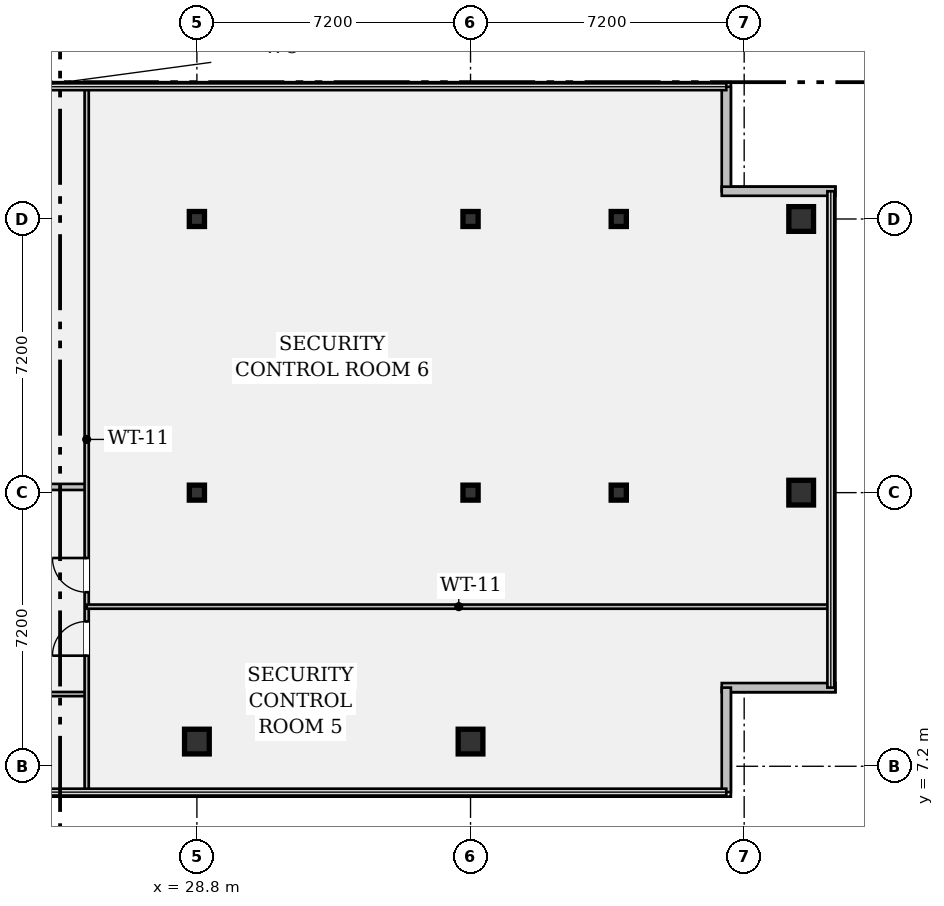
"""IFC4 building model, lengths in metres.
Left out: names, types, materials, properties, quantities, classifications, styles, units other than length and angle.
Written with IfcOpenShell. Run it as: python <this file> out.ifc"""

import sys

from ifc_helpers import new_model, si_unit, direction, frame, frame_2d, origin, origin_2d, place, context, subcontext, project, spatial, rectangle, hollow_rectangle, i_section, extrude, element, fill, save


model = new_model("IFC4")
c1 = context("Model", 3, precision=1e-05, world=origin(), true_north=direction((0.0, 1.0)))
c2 = subcontext(c1, "Body", "Model", "MODEL_VIEW")
j1 = project(units=[si_unit("LENGTHUNIT", "METRE"), si_unit("PLANEANGLEUNIT", "RADIAN")], contexts=[c1])
p1 = place(None, origin())
s1 = spatial("IfcSite", under=j1, at=p1, CompositionType="ELEMENT")
p2 = place(p1, origin())
s2 = spatial("IfcBuilding", under=s1, at=p2, CompositionType="ELEMENT")
p3 = place(p2, frame((0.0, 0.0, 241.15)))
s3 = spatial("IfcBuildingStorey", under=s2, at=p3, CompositionType="ELEMENT", Elevation=241.15)
p4 = place(p3, frame((28.8, 7.85, 0.0), z_axis=(0.0, 0.0, 1.0), x_axis=(1.0, 0.0, 0.0)))
e1 = element("IfcColumn", 1, at=p4, inside=s3, PredefinedType="COLUMN", context=c2, shape_type="SweptSolid", body=[
    extrude(hollow_rectangle(XDim=0.65, YDim=0.65, WallThickness=0.04, at=origin_2d()), origin(), (0.0, 0.0, 1.0), 3.24),
])
for number, where, z_axis, x_axis in (
    (2, (28.8, 14.4, 0.0), (0.0, 0.0, 1.0), (1.0, 0.0, 0.0)),
    (3, (28.8, 21.6, 0.0), (0.0, 0.0, 1.0), (1.0, 0.0, 0.0)),
):
    element("IfcColumn", number, at=place(p3, frame(where, z_axis=z_axis, x_axis=x_axis)), inside=s3, PredefinedType="COLUMN", context=c2, shape_type="SweptSolid", body=[
        extrude(i_section(OverallWidth=0.399, OverallDepth=0.394, WebThickness=0.023, FlangeThickness=0.037, FilletRadius=0.018, at=origin_2d()), origin(), (0.0, 0.0, 1.0), 3.24),
    ])
p5 = place(p3, frame((36.0, 7.85, 0.0), z_axis=(0.0, 0.0, 1.0), x_axis=(1.0, 0.0, 0.0)))
e4 = element("IfcColumn", 4, at=p5, inside=s3, PredefinedType="COLUMN", context=c2, shape_type="SweptSolid", body=[
    extrude(hollow_rectangle(XDim=0.65, YDim=0.65, WallThickness=0.04, at=origin_2d()), origin(), (0.0, 0.0, 1.0), 3.24),
])
for number, where, z_axis, x_axis in (
    (5, (36.0, 14.4, 0.0), (0.0, 0.0, 1.0), (1.0, 0.0, 0.0)),
    (6, (36.0, 21.6, 0.0), (0.0, 0.0, 1.0), (1.0, 0.0, 0.0)),
    (7, (39.9, 14.4, 0.0), (0.0, 0.0, 1.0), (1.0, 0.0, 0.0)),
    (8, (39.9, 21.6, 0.0), (0.0, 0.0, 1.0), (1.0, 0.0, 0.0)),
):
    element("IfcColumn", number, at=place(p3, frame(where, z_axis=z_axis, x_axis=x_axis)), inside=s3, PredefinedType="COLUMN", context=c2, shape_type="SweptSolid", body=[
        extrude(i_section(OverallWidth=0.399, OverallDepth=0.394, WebThickness=0.023, FlangeThickness=0.037, FilletRadius=0.018, at=origin_2d()), origin(), (0.0, 0.0, 1.0), 3.24),
    ])
for number, where, z_axis, x_axis in (
    (9, (44.7, 14.4, 0.0), (0.0, 0.0, 1.0), (1.0, 0.0, 0.0)),
    (10, (44.7, 21.6, 0.0), (0.0, 0.0, 1.0), (1.0, 0.0, 0.0)),
):
    element("IfcColumn", number, at=place(p3, frame(where, z_axis=z_axis, x_axis=x_axis)), inside=s3, PredefinedType="COLUMN", context=c2, shape_type="SweptSolid", body=[
        extrude(hollow_rectangle(XDim=0.65, YDim=0.65, WallThickness=0.04, at=origin_2d()), origin(), (0.0, 0.0, 1.0), 3.24),
    ])
p6 = place(p3, frame((42.73, 25.08, 0.0), z_axis=(0.0, 0.0, 1.0), x_axis=(0.0, -1.0, 0.0)))
e11 = element("IfcWall", 11, at=p6, inside=s3, PredefinedType="STANDARD", context=c2, shape_type="SweptSolid", body=[
    extrude(rectangle(XDim=2.75, YDim=0.24, at=frame_2d((1.375, 0.0))), origin(), (0.0, 0.0, 1.0), 3.24),
])
for number, where, z_axis, x_axis in (
    (12, (42.61, 22.33, 0.0), (0.0, 0.0, 1.0), (1.0, 0.0, 0.0)),
    (13, (45.6, 9.27, 0.0), (0.0, 0.0, 1.0), (-1.0, 0.0, 0.0)),
):
    element("IfcWall", number, at=place(p3, frame(where, z_axis=z_axis, x_axis=x_axis)), inside=s3, PredefinedType="STANDARD", context=c2, shape_type="SweptSolid", body=[
        extrude(rectangle(XDim=2.99, YDim=0.24, at=frame_2d((1.495, 0.0))), origin(), (0.0, 0.0, 1.0), 3.24),
    ])
p7 = place(p3, frame((42.73, 9.27, 0.0), z_axis=(0.0, 0.0, 1.0), x_axis=(0.0, -1.0, 0.0)))
e14 = element("IfcWall", 14, at=p7, inside=s3, PredefinedType="STANDARD", context=c2, shape_type="SweptSolid", body=[
    extrude(rectangle(XDim=2.75, YDim=0.24, at=frame_2d((1.375, 0.0))), origin(), (0.0, 0.0, 1.0), 3.24),
])
p8 = place(p3, frame((23.95, 9.1, 0.0), z_axis=(0.0, 0.0, 1.0), x_axis=(1.0, 0.0, 0.0)))
e15 = element("IfcWall", 15, at=p8, inside=s3, PredefinedType="PARTITIONING", context=c2, shape_type="SweptSolid", body=[
    extrude(rectangle(XDim=1.95, YDim=0.11, at=frame_2d((0.975, 0.0))), origin(), (0.0, 0.0, 1.0), 3.24),
])
p9 = place(p3, frame((23.95, 14.55, 0.0), z_axis=(0.0, 0.0, 1.0), x_axis=(1.0, 0.0, 0.0)))
e16 = element("IfcWall", 16, at=p9, inside=s3, PredefinedType="PARTITIONING", context=c2, shape_type="SweptSolid", body=[
    extrude(rectangle(XDim=1.95, YDim=0.16, at=frame_2d((0.975, 0.0))), origin(), (0.0, 0.0, 1.0), 2.676),
])
p10 = place(p3, frame((25.9, 6.52, 0.0), z_axis=(0.0, 0.0, 1.0), x_axis=(0.0, 1.0, 0.0)))
e17 = element("IfcWall", 17, at=p10, inside=s3, PredefinedType="PARTITIONING", context=c2, shape_type="SweptSolid", body=[
    extrude(rectangle(XDim=18.56, YDim=0.11, at=frame_2d((9.28, 0.0))), origin(), (0.0, 0.0, 1.0), 2.676),
])
p11 = place(p10, frame((3.59, 0.0, 0.0)))
e18 = element("IfcOpeningElement", 18, at=p11, cuts=e17, PredefinedType="OPENING", context=c2, shape_type="SweptSolid", body=[
    extrude(rectangle(XDim=0.9, YDim=2.15, at=frame_2d((0.45, 1.075))), frame((0.0, 0.067, 0.0), z_axis=(0.0, -1.0, 0.0), x_axis=(1.0, 0.0, 0.0)), (0.0, 0.0, 1.0), 0.134),
])
p12 = place(p10, frame((5.26, 0.0, 0.0)))
e19 = element("IfcOpeningElement", 19, at=p12, cuts=e17, PredefinedType="OPENING", context=c2, shape_type="SweptSolid", body=[
    extrude(rectangle(XDim=0.9, YDim=2.15, at=frame_2d((0.45, 1.075))), frame((0.0, 0.067, 0.0), z_axis=(0.0, -1.0, 0.0), x_axis=(1.0, 0.0, 0.0)), (0.0, 0.0, 1.0), 0.134),
])
p13 = place(p3, frame((25.9, 11.4, 0.0), z_axis=(0.0, 0.0, 1.0), x_axis=(1.0, 0.0, 0.0)))
e20 = element("IfcWall", 20, at=p13, inside=s3, PredefinedType="PARTITIONING", context=c2, shape_type="SweptSolid", body=[
    extrude(rectangle(XDim=19.58, YDim=0.11, at=frame_2d((9.79, 0.0))), origin(), (0.0, 0.0, 1.0), 2.676),
])
p14 = place(p11, origin())
e21 = element("IfcDoor", 21, at=p14, inside=s3, OperationType="SINGLE_SWING_LEFT", PredefinedType="DOOR", context=c2, shape_type="SweptSolid", body=[
    extrude(rectangle(XDim=0.9, YDim=2.15, at=frame_2d((0.45, 1.075))), frame((0.0, 0.025, 0.0), z_axis=(0.0, -1.0, 0.0), x_axis=(1.0, 0.0, 0.0)), (0.0, 0.0, 1.0), 0.05),
])
fill(e18, e21)
p15 = place(p12, origin())
e22 = element("IfcDoor", 22, at=p15, inside=s3, OperationType="SINGLE_SWING_RIGHT", PredefinedType="DOOR", context=c2, shape_type="SweptSolid", body=[
    extrude(rectangle(XDim=0.9, YDim=2.15, at=frame_2d((0.45, 1.075))), frame((0.0, 0.025, 0.0), z_axis=(0.0, -1.0, 0.0), x_axis=(1.0, 0.0, 0.0)), (0.0, 0.0, 1.0), 0.05),
])
fill(e19, e22)
save(model, sys.argv[1])
